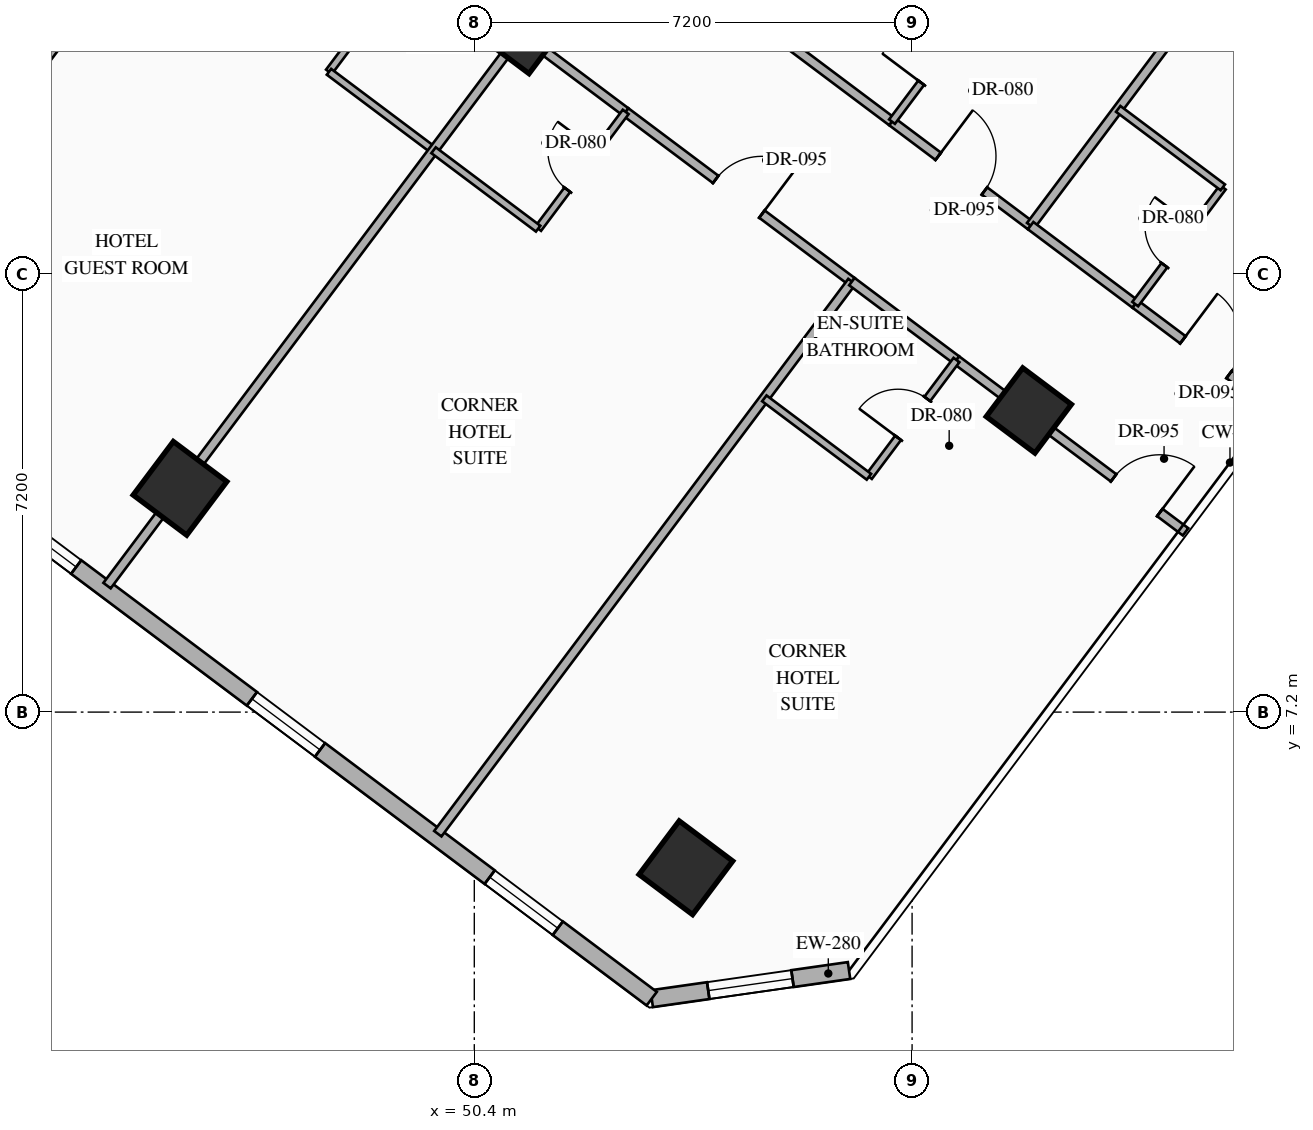
"""IFC4 building model, lengths in metres.
Left out: names, types, materials, properties, quantities, classifications, styles, units other than length and angle.
Written with IfcOpenShell. Run it as: python <this file> out.ifc"""

import sys

from ifc_helpers import new_model, si_unit, direction, frame, frame_2d, origin, origin_2d, place, context, subcontext, project, spatial, rectangle, hollow_rectangle, extrude, element, fill, save


model = new_model("IFC4")
c1 = context("Model", 3, precision=1e-05, world=origin(), true_north=direction((0.0, 1.0)))
c2 = subcontext(c1, "Body", "Model", "MODEL_VIEW")
j1 = project(units=[si_unit("LENGTHUNIT", "METRE"), si_unit("PLANEANGLEUNIT", "RADIAN")], contexts=[c1])
p1 = place(None, origin())
s1 = spatial("IfcSite", under=j1, at=p1, CompositionType="ELEMENT")
p2 = place(p1, origin())
s2 = spatial("IfcBuilding", under=s1, at=p2, CompositionType="ELEMENT")
p3 = place(p2, frame((0.0, 0.0, 36.6)))
s3 = spatial("IfcBuildingStorey", under=s2, at=p3, CompositionType="ELEMENT", Elevation=36.6)
p4 = place(p3, frame((45.56, 10.88, 0.0), z_axis=(0.0, 0.0, 1.0), x_axis=(0.799999996291, -0.600000004945, 0.0)))
e1 = element("IfcColumn", 1, at=p4, inside=s3, PredefinedType="COLUMN", context=c2, shape_type="SweptSolid", body=[
    extrude(hollow_rectangle(XDim=1.1, YDim=1.1, WallThickness=0.04, at=origin_2d()), origin(), (0.0, 0.0, 1.0), 3.35),
])
p5 = place(p3, frame((51.2, 18.4, 0.0), z_axis=(0.0, 0.0, 1.0), x_axis=(0.799999996291, -0.600000004945, 0.0)))
e2 = element("IfcColumn", 2, at=p5, inside=s3, PredefinedType="COLUMN", context=c2, shape_type="SweptSolid", body=[
    extrude(hollow_rectangle(XDim=1.0, YDim=1.0, WallThickness=0.038, at=origin_2d()), origin(), (0.0, 0.0, 1.0), 3.35),
])
p6 = place(p3, frame((53.88, 4.64, 0.0), z_axis=(0.0, 0.0, 1.0), x_axis=(0.799999996291, -0.600000004945, 0.0)))
e3 = element("IfcColumn", 3, at=p6, inside=s3, PredefinedType="COLUMN", context=c2, shape_type="SweptSolid", body=[
    extrude(hollow_rectangle(XDim=1.1, YDim=1.1, WallThickness=0.04, at=origin_2d()), origin(), (0.0, 0.0, 1.0), 3.35),
])
p7 = place(p3, frame((59.52, 12.16, 0.0), z_axis=(0.0, 0.0, 1.0), x_axis=(0.799999996291, -0.600000004945, 0.0)))
e4 = element("IfcColumn", 4, at=p7, inside=s3, PredefinedType="COLUMN", context=c2, shape_type="SweptSolid", body=[
    extrude(hollow_rectangle(XDim=1.0, YDim=1.0, WallThickness=0.038, at=origin_2d()), origin(), (0.0, 0.0, 1.0), 3.35),
])
p8 = place(p3, frame((56.563, 2.95, 0.0), z_axis=(0.0, 0.0, 1.0), x_axis=(-0.989977778067, -0.141223223777, 0.0)))
e5 = element("IfcWall", 5, at=p8, inside=s3, PredefinedType="STANDARD", context=c2, shape_type="SweptSolid", body=[
    extrude(rectangle(XDim=3.278, YDim=0.28, at=frame_2d((1.639, 0.0))), origin(), (0.0, 0.0, 1.0), 3.13),
])
p9 = place(p8, frame((0.939, 0.0, 0.85)))
e6 = element("IfcOpeningElement", 6, at=p9, cuts=e5, PredefinedType="OPENING", context=c2, shape_type="SweptSolid", body=[
    extrude(rectangle(XDim=1.4, YDim=1.8, at=frame_2d((0.7, 0.9))), frame((0.0, 0.15, 0.0), z_axis=(0.0, -1.0, 0.0), x_axis=(1.0, 0.0, 0.0)), (0.0, 0.0, 1.0), 0.3),
])
p10 = place(p3, frame((53.318, 2.487, 0.0), z_axis=(0.0, 0.0, 1.0), x_axis=(-0.800004174678, 0.599994433723, 0.0)))
e7 = element("IfcWall", 7, at=p10, inside=s3, PredefinedType="STANDARD", context=c2, shape_type="SweptSolid", body=[
    extrude(rectangle(XDim=35.089, YDim=0.28, at=frame_2d((17.544, 0.0))), origin(), (0.0, 0.0, 1.0), 3.13),
])
p11 = place(p10, frame((1.931, 0.0, 0.85)))
e8 = element("IfcOpeningElement", 8, at=p11, cuts=e7, PredefinedType="OPENING", context=c2, shape_type="SweptSolid", body=[
    extrude(rectangle(XDim=1.4, YDim=1.8, at=frame_2d((0.7, 0.9))), frame((0.0, 0.15, 0.0), z_axis=(0.0, -1.0, 0.0), x_axis=(1.0, 0.0, 0.0)), (0.0, 0.0, 1.0), 0.3),
])
p12 = place(p10, frame((6.819, 0.0, 0.85)))
e9 = element("IfcOpeningElement", 9, at=p12, cuts=e7, PredefinedType="OPENING", context=c2, shape_type="SweptSolid", body=[
    extrude(rectangle(XDim=1.4, YDim=1.8, at=frame_2d((0.7, 0.9))), frame((0.0, 0.15, 0.0), z_axis=(0.0, -1.0, 0.0), x_axis=(1.0, 0.0, 0.0)), (0.0, 0.0, 1.0), 0.3),
])
p13 = place(p10, frame((11.832, 0.0, 0.85)))
e10 = element("IfcOpeningElement", 10, at=p13, cuts=e7, PredefinedType="OPENING", context=c2, shape_type="SweptSolid", body=[
    extrude(rectangle(XDim=1.4, YDim=1.8, at=frame_2d((0.7, 0.9))), frame((0.0, 0.15, 0.0), z_axis=(0.0, -1.0, 0.0), x_axis=(1.0, 0.0, 0.0)), (0.0, 0.0, 1.0), 0.3),
])
p14 = place(p10, frame((17.647, 0.0, 0.85)))
e11 = element("IfcOpeningElement", 11, at=p14, cuts=e7, PredefinedType="OPENING", context=c2, shape_type="SweptSolid", body=[
    extrude(rectangle(XDim=1.4, YDim=1.8, at=frame_2d((0.7, 0.9))), frame((0.0, 0.15, 0.0), z_axis=(0.0, -1.0, 0.0), x_axis=(1.0, 0.0, 0.0)), (0.0, 0.0, 1.0), 0.3),
])
p15 = place(p10, frame((21.857, 0.0, 0.85)))
e12 = element("IfcOpeningElement", 12, at=p15, cuts=e7, PredefinedType="OPENING", context=c2, shape_type="SweptSolid", body=[
    extrude(rectangle(XDim=1.4, YDim=1.8, at=frame_2d((0.7, 0.9))), frame((0.0, 0.15, 0.0), z_axis=(0.0, -1.0, 0.0), x_axis=(1.0, 0.0, 0.0)), (0.0, 0.0, 1.0), 0.3),
])
p16 = place(p10, frame((26.87, 0.0, 0.85)))
e13 = element("IfcOpeningElement", 13, at=p16, cuts=e7, PredefinedType="OPENING", context=c2, shape_type="SweptSolid", body=[
    extrude(rectangle(XDim=1.4, YDim=1.8, at=frame_2d((0.7, 0.9))), frame((0.0, 0.15, 0.0), z_axis=(0.0, -1.0, 0.0), x_axis=(1.0, 0.0, 0.0)), (0.0, 0.0, 1.0), 0.3),
])
p17 = place(p10, frame((31.757, 0.0, 0.85)))
e14 = element("IfcOpeningElement", 14, at=p17, cuts=e7, PredefinedType="OPENING", context=c2, shape_type="SweptSolid", body=[
    extrude(rectangle(XDim=1.4, YDim=1.8, at=frame_2d((0.7, 0.9))), frame((0.0, 0.15, 0.0), z_axis=(0.0, -1.0, 0.0), x_axis=(1.0, 0.0, 0.0)), (0.0, 0.0, 1.0), 0.3),
])
p18 = place(p3, frame((39.464, 12.752, 0.0), z_axis=(0.0, 0.0, 1.0), x_axis=(0.6, 0.8, 0.0)))
e15 = element("IfcWall", 15, at=p18, inside=s3, PredefinedType="PARTITIONING", context=c2, shape_type="SweptSolid", body=[
    extrude(rectangle(XDim=11.51, YDim=0.15, at=frame_2d((5.755, 0.0))), origin(), (0.0, 0.0, 1.0), 3.13),
])
p19 = place(p3, frame((55.55, 18.2, 0.0), z_axis=(0.0, 0.0, 1.0), x_axis=(0.79998637334, -0.60001816845, 0.0)))
e16 = element("IfcWall", 16, at=p19, inside=s3, PredefinedType="PARTITIONING", context=c2, shape_type="SweptSolid", body=[
    extrude(rectangle(XDim=2.15, YDim=0.15, at=frame_2d((1.075, 0.0))), origin(), (0.0, 0.0, 1.0), 2.775),
])
p20 = place(p3, frame((57.27, 16.91, 0.0), z_axis=(0.0, 0.0, 1.0), x_axis=(0.800010279488, -0.599986293772, 0.0)))
e17 = element("IfcWall", 17, at=p20, inside=s3, PredefinedType="PARTITIONING", context=c2, shape_type="SweptSolid", body=[
    extrude(rectangle(XDim=2.85, YDim=0.15, at=frame_2d((1.425, 0.0))), origin(), (0.0, 0.0, 1.0), 2.775),
])
p21 = place(p20, frame((0.95, 0.0, 0.0)))
e18 = element("IfcOpeningElement", 18, at=p21, cuts=e17, PredefinedType="OPENING", context=c2, shape_type="SweptSolid", body=[
    extrude(rectangle(XDim=0.95, YDim=2.15, at=frame_2d((0.475, 1.075))), frame((0.0, 0.085, 0.0), z_axis=(0.0, -1.0, 0.0), x_axis=(1.0, 0.0, 0.0)), (0.0, 0.0, 1.0), 0.17),
])
p22 = place(p3, frame((57.27, 16.91, 0.0), z_axis=(0.0, 0.0, 1.0), x_axis=(0.599951172744, 0.800036618114, 0.0)))
e19 = element("IfcWall", 19, at=p22, inside=s3, PredefinedType="PARTITIONING", context=c2, shape_type="SweptSolid", body=[
    extrude(rectangle(XDim=2.4, YDim=0.12, at=frame_2d((1.2, 0.0))), origin(), (0.0, 0.0, 1.0), 3.13),
])
p23 = place(p22, frame((0.8, 0.0, 0.0)))
e20 = element("IfcOpeningElement", 20, at=p23, cuts=e19, PredefinedType="OPENING", context=c2, shape_type="SweptSolid", body=[
    extrude(rectangle(XDim=0.8, YDim=2.06, at=frame_2d((0.4, 1.03))), frame((0.0, 0.07, 0.0), z_axis=(0.0, -1.0, 0.0), x_axis=(1.0, 0.0, 0.0)), (0.0, 0.0, 1.0), 0.14),
])
p24 = place(p3, frame((59.55, 15.2, 0.0), z_axis=(0.0, 0.0, 1.0), x_axis=(0.599996617946, 0.80000253653, 0.0)))
e21 = element("IfcWall", 21, at=p24, inside=s3, PredefinedType="PARTITIONING", context=c2, shape_type="SweptSolid", body=[
    extrude(rectangle(XDim=11.55, YDim=0.15, at=frame_2d((5.775, 0.0))), origin(), (0.0, 0.0, 1.0), 3.13),
])
p25 = place(p3, frame((59.55, 15.2, 0.0), z_axis=(0.0, 0.0, 1.0), x_axis=(0.79998637334, -0.60001816845, 0.0)))
e22 = element("IfcWall", 22, at=p25, inside=s3, PredefinedType="PARTITIONING", context=c2, shape_type="SweptSolid", body=[
    extrude(rectangle(XDim=2.15, YDim=0.15, at=frame_2d((1.075, 0.0))), origin(), (0.0, 0.0, 1.0), 2.775),
])
p26 = place(p3, frame((61.27, 13.91, 0.0), z_axis=(0.0, 0.0, 1.0), x_axis=(0.800010068184, -0.59998657552, 0.0)))
e23 = element("IfcWall", 23, at=p26, inside=s3, PredefinedType="PARTITIONING", context=c2, shape_type="SweptSolid", body=[
    extrude(rectangle(XDim=2.91, YDim=0.15, at=frame_2d((1.455, 0.0))), origin(), (0.0, 0.0, 1.0), 3.13),
])
p27 = place(p26, frame((0.98, 0.0, 0.0)))
e24 = element("IfcOpeningElement", 24, at=p27, cuts=e23, PredefinedType="OPENING", context=c2, shape_type="SweptSolid", body=[
    extrude(rectangle(XDim=0.95, YDim=2.15, at=frame_2d((0.475, 1.075))), frame((0.0, 0.085, 0.0), z_axis=(0.0, -1.0, 0.0), x_axis=(1.0, 0.0, 0.0)), (0.0, 0.0, 1.0), 0.17),
])
p28 = place(p3, frame((61.27, 13.91, 0.0), z_axis=(0.0, 0.0, 1.0), x_axis=(0.599951172744, 0.800036618114, 0.0)))
e25 = element("IfcWall", 25, at=p28, inside=s3, PredefinedType="PARTITIONING", context=c2, shape_type="SweptSolid", body=[
    extrude(rectangle(XDim=2.4, YDim=0.12, at=frame_2d((1.2, 0.0))), origin(), (0.0, 0.0, 1.0), 3.13),
])
p29 = place(p28, frame((0.8, 0.0, 0.0)))
e26 = element("IfcOpeningElement", 26, at=p29, cuts=e25, PredefinedType="OPENING", context=c2, shape_type="SweptSolid", body=[
    extrude(rectangle(XDim=0.8, YDim=2.06, at=frame_2d((0.4, 1.03))), frame((0.0, 0.07, 0.0), z_axis=(0.0, -1.0, 0.0), x_axis=(1.0, 0.0, 0.0)), (0.0, 0.0, 1.0), 0.14),
])
p30 = place(p3, frame((60.99, 17.12, 0.0), z_axis=(0.0, 0.0, 1.0), x_axis=(0.79998637334, -0.60001816845, 0.0)))
e27 = element("IfcWall", 27, at=p30, inside=s3, PredefinedType="PARTITIONING", context=c2, shape_type="SweptSolid", body=[
    extrude(rectangle(XDim=2.15, YDim=0.12, at=frame_2d((1.075, 0.0))), origin(), (0.0, 0.0, 1.0), 3.13),
])
p31 = place(p3, frame((48.01, 17.73, 0.0), z_axis=(0.0, 0.0, 1.0), x_axis=(0.6, 0.8, 0.0)))
e28 = element("IfcWall", 28, at=p31, inside=s3, PredefinedType="PARTITIONING", context=c2, shape_type="SweptSolid", body=[
    extrude(rectangle(XDim=2.4, YDim=0.12, at=frame_2d((1.2, 0.0))), origin(), (0.0, 0.0, 1.0), 3.13),
])
p32 = place(p31, frame((0.8, 0.0, 0.0)))
e29 = element("IfcOpeningElement", 29, at=p32, cuts=e28, PredefinedType="OPENING", context=c2, shape_type="SweptSolid", body=[
    extrude(rectangle(XDim=0.8, YDim=2.06, at=frame_2d((0.4, 1.03))), frame((0.0, 0.07, 0.0), z_axis=(0.0, -1.0, 0.0), x_axis=(1.0, 0.0, 0.0)), (0.0, 0.0, 1.0), 0.14),
])
p33 = place(p3, frame((48.01, 17.73, 0.0), z_axis=(0.0, 0.0, 1.0), x_axis=(0.79998637334, -0.60001816845, 0.0)))
e30 = element("IfcWall", 30, at=p33, inside=s3, PredefinedType="PARTITIONING", context=c2, shape_type="SweptSolid", body=[
    extrude(rectangle(XDim=2.15, YDim=0.12, at=frame_2d((1.075, 0.0))), origin(), (0.0, 0.0, 1.0), 3.13),
])
p34 = place(p3, frame((44.36, 9.28, 0.0), z_axis=(0.0, 0.0, 1.0), x_axis=(0.599986233332, 0.800010324816, 0.0)))
e31 = element("IfcWall", 31, at=p34, inside=s3, PredefinedType="PARTITIONING", context=c2, shape_type="SweptSolid", body=[
    extrude(rectangle(XDim=11.35, YDim=0.15, at=frame_2d((5.675, 0.0))), origin(), (0.0, 0.0, 1.0), 2.425),
])
p35 = place(p3, frame((51.17, 18.36, 0.0), z_axis=(0.0, 0.0, 1.0), x_axis=(0.79998637334, -0.60001816845, 0.0)))
e32 = element("IfcWall", 32, at=p35, inside=s3, PredefinedType="PARTITIONING", context=c2, shape_type="SweptSolid", body=[
    extrude(rectangle(XDim=2.15, YDim=0.15, at=frame_2d((1.075, 0.0))), origin(), (0.0, 0.0, 1.0), 2.425),
])
p36 = place(p3, frame((52.89, 17.07, 0.0), z_axis=(0.0, 0.0, 1.0), x_axis=(0.800012600101, -0.599983199498, 0.0)))
e33 = element("IfcWall", 33, at=p36, inside=s3, PredefinedType="PARTITIONING", context=c2, shape_type="SweptSolid", body=[
    extrude(rectangle(XDim=4.65, YDim=0.15, at=frame_2d((2.325, 0.0))), origin(), (0.0, 0.0, 1.0), 2.425),
])
p37 = place(p36, frame((1.85, 0.0, 0.0)))
e34 = element("IfcOpeningElement", 34, at=p37, cuts=e33, PredefinedType="OPENING", context=c2, shape_type="SweptSolid", body=[
    extrude(rectangle(XDim=0.95, YDim=2.15, at=frame_2d((0.475, 1.075))), frame((0.0, 0.085, 0.0), z_axis=(0.0, -1.0, 0.0), x_axis=(1.0, 0.0, 0.0)), (0.0, 0.0, 1.0), 0.17),
])
p38 = place(p3, frame((51.45, 15.15, 0.0), z_axis=(0.0, 0.0, 1.0), x_axis=(0.599951172744, 0.800036618114, 0.0)))
e35 = element("IfcWall", 35, at=p38, inside=s3, PredefinedType="PARTITIONING", context=c2, shape_type="SweptSolid", body=[
    extrude(rectangle(XDim=2.4, YDim=0.12, at=frame_2d((1.2, 0.0))), origin(), (0.0, 0.0, 1.0), 3.13),
])
p39 = place(p38, frame((0.8, 0.0, 0.0)))
e36 = element("IfcOpeningElement", 36, at=p39, cuts=e35, PredefinedType="OPENING", context=c2, shape_type="SweptSolid", body=[
    extrude(rectangle(XDim=0.8, YDim=2.06, at=frame_2d((0.4, 1.03))), frame((0.0, 0.07, 0.0), z_axis=(0.0, -1.0, 0.0), x_axis=(1.0, 0.0, 0.0)), (0.0, 0.0, 1.0), 0.14),
])
p40 = place(p3, frame((49.73, 16.44, 0.0), z_axis=(0.0, 0.0, 1.0), x_axis=(0.79998637334, -0.60001816845, 0.0)))
e37 = element("IfcWall", 37, at=p40, inside=s3, PredefinedType="PARTITIONING", context=c2, shape_type="SweptSolid", body=[
    extrude(rectangle(XDim=2.15, YDim=0.12, at=frame_2d((1.075, 0.0))), origin(), (0.0, 0.0, 1.0), 3.13),
])
p41 = place(p3, frame((49.8, 5.2, 0.0), z_axis=(0.0, 0.0, 1.0), x_axis=(0.6, 0.8, 0.0)))
e38 = element("IfcWall", 38, at=p41, inside=s3, PredefinedType="PARTITIONING", context=c2, shape_type="SweptSolid", body=[
    extrude(rectangle(XDim=11.35, YDim=0.15, at=frame_2d((5.675, 0.0))), origin(), (0.0, 0.0, 1.0), 3.13),
])
p42 = place(p3, frame((56.61, 14.28, 0.0), z_axis=(0.0, 0.0, 1.0), x_axis=(0.79998637334, -0.60001816845, 0.0)))
e39 = element("IfcWall", 39, at=p42, inside=s3, PredefinedType="PARTITIONING", context=c2, shape_type="SweptSolid", body=[
    extrude(rectangle(XDim=2.15, YDim=0.15, at=frame_2d((1.075, 0.0))), origin(), (0.0, 0.0, 1.0), 2.425),
])
p43 = place(p3, frame((58.33, 12.99, 0.0), z_axis=(0.0, 0.0, 1.0), x_axis=(0.799993779569, -0.600008293819, 0.0)))
e40 = element("IfcWall", 40, at=p43, inside=s3, PredefinedType="PARTITIONING", context=c2, shape_type="SweptSolid", body=[
    extrude(rectangle(XDim=4.71, YDim=0.15, at=frame_2d((2.355, 0.0))), origin(), (0.0, 0.0, 1.0), 2.425),
])
p44 = place(p43, frame((3.23, 0.0, 0.0)))
e41 = element("IfcOpeningElement", 41, at=p44, cuts=e40, PredefinedType="OPENING", context=c2, shape_type="SweptSolid", body=[
    extrude(rectangle(XDim=0.95, YDim=2.15, at=frame_2d((0.475, 1.075))), frame((0.0, 0.085, 0.0), z_axis=(0.0, -1.0, 0.0), x_axis=(1.0, 0.0, 0.0)), (0.0, 0.0, 1.0), 0.17),
])
p45 = place(p3, frame((56.89, 11.07, 0.0), z_axis=(0.0, 0.0, 1.0), x_axis=(0.600065100855, 0.79995117022, 0.0)))
e42 = element("IfcWall", 42, at=p45, inside=s3, PredefinedType="PARTITIONING", context=c2, shape_type="SweptSolid", body=[
    extrude(rectangle(XDim=2.4, YDim=0.12, at=frame_2d((1.2, 0.0))), origin(), (0.0, 0.0, 1.0), 3.13),
])
p46 = place(p45, frame((0.8, 0.0, 0.0)))
e43 = element("IfcOpeningElement", 43, at=p46, cuts=e42, PredefinedType="OPENING", context=c2, shape_type="SweptSolid", body=[
    extrude(rectangle(XDim=0.8, YDim=2.06, at=frame_2d((0.4, 1.03))), frame((0.0, 0.07, 0.0), z_axis=(0.0, -1.0, 0.0), x_axis=(1.0, 0.0, 0.0)), (0.0, 0.0, 1.0), 0.14),
])
p47 = place(p3, frame((55.17, 12.36, 0.0), z_axis=(0.0, 0.0, 1.0), x_axis=(0.79998637334, -0.60001816845, 0.0)))
e44 = element("IfcWall", 44, at=p47, inside=s3, PredefinedType="PARTITIONING", context=c2, shape_type="SweptSolid", body=[
    extrude(rectangle(XDim=2.15, YDim=0.12, at=frame_2d((1.075, 0.0))), origin(), (0.0, 0.0, 1.0), 3.13),
])
p48 = place(p9, origin())
e45 = element("IfcWindow", 45, at=p48, inside=s3, PartitioningType="SINGLE_PANEL", PredefinedType="WINDOW", context=c2, shape_type="SweptSolid", body=[
    extrude(rectangle(XDim=1.4, YDim=1.8, at=frame_2d((0.7, 0.9))), frame((0.0, 0.03, 0.0), z_axis=(0.0, -1.0, 0.0), x_axis=(1.0, 0.0, 0.0)), (0.0, 0.0, 1.0), 0.06),
])
fill(e6, e45)
p49 = place(p11, origin())
e46 = element("IfcWindow", 46, at=p49, inside=s3, PartitioningType="SINGLE_PANEL", PredefinedType="WINDOW", context=c2, shape_type="SweptSolid", body=[
    extrude(rectangle(XDim=1.4, YDim=1.8, at=frame_2d((0.7, 0.9))), frame((0.0, 0.03, 0.0), z_axis=(0.0, -1.0, 0.0), x_axis=(1.0, 0.0, 0.0)), (0.0, 0.0, 1.0), 0.06),
])
fill(e8, e46)
p50 = place(p12, origin())
e47 = element("IfcWindow", 47, at=p50, inside=s3, PartitioningType="SINGLE_PANEL", PredefinedType="WINDOW", context=c2, shape_type="SweptSolid", body=[
    extrude(rectangle(XDim=1.4, YDim=1.8, at=frame_2d((0.7, 0.9))), frame((0.0, 0.03, 0.0), z_axis=(0.0, -1.0, 0.0), x_axis=(1.0, 0.0, 0.0)), (0.0, 0.0, 1.0), 0.06),
])
fill(e9, e47)
p51 = place(p13, origin())
e48 = element("IfcWindow", 48, at=p51, inside=s3, PartitioningType="SINGLE_PANEL", PredefinedType="WINDOW", context=c2, shape_type="SweptSolid", body=[
    extrude(rectangle(XDim=1.4, YDim=1.8, at=frame_2d((0.7, 0.9))), frame((0.0, 0.03, 0.0), z_axis=(0.0, -1.0, 0.0), x_axis=(1.0, 0.0, 0.0)), (0.0, 0.0, 1.0), 0.06),
])
fill(e10, e48)
p52 = place(p21, origin())
e49 = element("IfcDoor", 49, at=p52, inside=s3, OperationType="SINGLE_SWING_LEFT", PredefinedType="DOOR", context=c2, shape_type="SweptSolid", body=[
    extrude(rectangle(XDim=0.95, YDim=2.15, at=frame_2d((0.475, 1.075))), frame((0.0, 0.025, 0.0), z_axis=(0.0, -1.0, 0.0), x_axis=(1.0, 0.0, 0.0)), (0.0, 0.0, 1.0), 0.05),
])
fill(e18, e49)
p53 = place(p23, origin())
e50 = element("IfcDoor", 50, at=p53, inside=s3, OperationType="SINGLE_SWING_LEFT", PredefinedType="DOOR", context=c2, shape_type="SweptSolid", body=[
    extrude(rectangle(XDim=0.8, YDim=2.06, at=frame_2d((0.4, 1.03))), frame((0.0, 0.025, 0.0), z_axis=(0.0, -1.0, 0.0), x_axis=(1.0, 0.0, 0.0)), (0.0, 0.0, 1.0), 0.05),
])
fill(e20, e50)
p54 = place(p27, origin())
e51 = element("IfcDoor", 51, at=p54, inside=s3, OperationType="SINGLE_SWING_LEFT", PredefinedType="DOOR", context=c2, shape_type="SweptSolid", body=[
    extrude(rectangle(XDim=0.95, YDim=2.15, at=frame_2d((0.475, 1.075))), frame((0.0, 0.025, 0.0), z_axis=(0.0, -1.0, 0.0), x_axis=(1.0, 0.0, 0.0)), (0.0, 0.0, 1.0), 0.05),
])
fill(e24, e51)
p55 = place(p29, origin())
e52 = element("IfcDoor", 52, at=p55, inside=s3, OperationType="SINGLE_SWING_RIGHT", PredefinedType="DOOR", context=c2, shape_type="SweptSolid", body=[
    extrude(rectangle(XDim=0.8, YDim=2.06, at=frame_2d((0.4, 1.03))), frame((0.0, 0.025, 0.0), z_axis=(0.0, -1.0, 0.0), x_axis=(1.0, 0.0, 0.0)), (0.0, 0.0, 1.0), 0.05),
])
fill(e26, e52)
p56 = place(p37, origin())
e53 = element("IfcDoor", 53, at=p56, inside=s3, OperationType="SINGLE_SWING_RIGHT", PredefinedType="DOOR", context=c2, shape_type="SweptSolid", body=[
    extrude(rectangle(XDim=0.95, YDim=2.15, at=frame_2d((0.475, 1.075))), frame((0.0, 0.025, 0.0), z_axis=(0.0, -1.0, 0.0), x_axis=(1.0, 0.0, 0.0)), (0.0, 0.0, 1.0), 0.05),
])
fill(e34, e53)
p57 = place(p39, origin())
e54 = element("IfcDoor", 54, at=p57, inside=s3, OperationType="SINGLE_SWING_RIGHT", PredefinedType="DOOR", context=c2, shape_type="SweptSolid", body=[
    extrude(rectangle(XDim=0.8, YDim=2.06, at=frame_2d((0.4, 1.03))), frame((0.0, 0.025, 0.0), z_axis=(0.0, -1.0, 0.0), x_axis=(1.0, 0.0, 0.0)), (0.0, 0.0, 1.0), 0.05),
])
fill(e36, e54)
p58 = place(p44, origin())
e55 = element("IfcDoor", 55, at=p58, inside=s3, OperationType="SINGLE_SWING_RIGHT", PredefinedType="DOOR", context=c2, shape_type="SweptSolid", body=[
    extrude(rectangle(XDim=0.95, YDim=2.15, at=frame_2d((0.475, 1.075))), frame((0.0, 0.025, 0.0), z_axis=(0.0, -1.0, 0.0), x_axis=(1.0, 0.0, 0.0)), (0.0, 0.0, 1.0), 0.05),
])
fill(e41, e55)
p59 = place(p46, origin())
e56 = element("IfcDoor", 56, at=p59, inside=s3, OperationType="SINGLE_SWING_LEFT", PredefinedType="DOOR", context=c2, shape_type="SweptSolid", body=[
    extrude(rectangle(XDim=0.8, YDim=2.06, at=frame_2d((0.4, 1.03))), frame((0.0, 0.025, 0.0), z_axis=(0.0, -1.0, 0.0), x_axis=(1.0, 0.0, 0.0)), (0.0, 0.0, 1.0), 0.05),
])
fill(e43, e56)
save(model, sys.argv[1])
